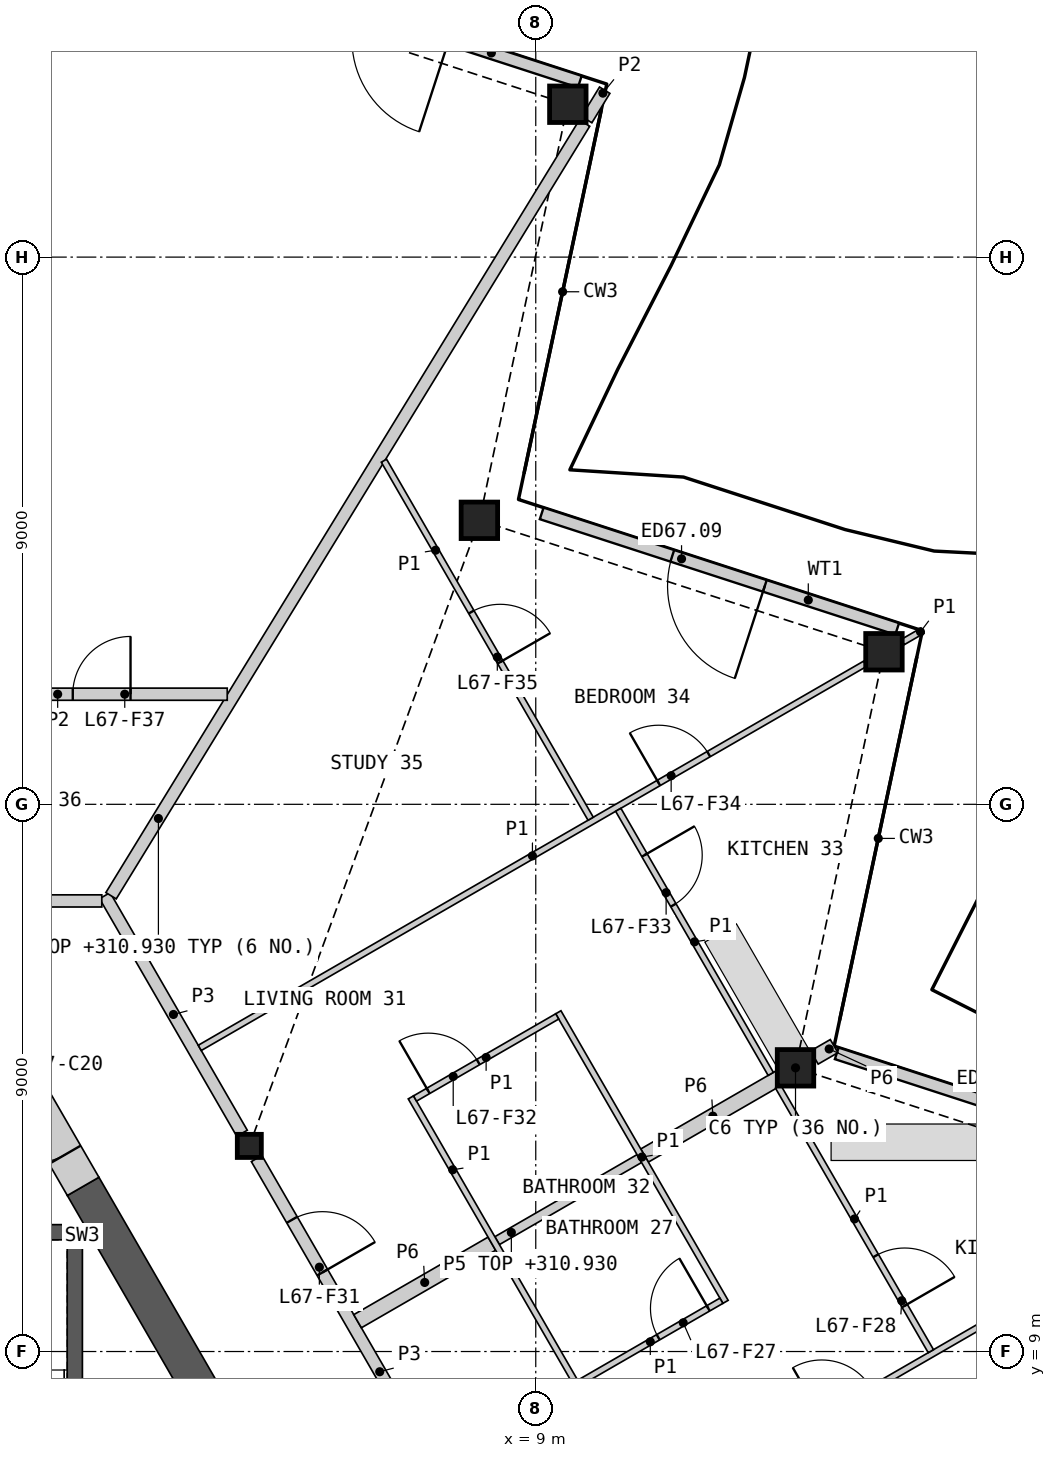
"""IFC4 building model, lengths in metres.
Left out: names, types, materials, properties, quantities, classifications, styles, units other than length and angle.
Written with IfcOpenShell. Run it as: python <this file> out.ifc"""

import sys

from ifc_helpers import new_model, si_unit, direction, frame, frame_2d, origin, origin_2d, place, context, subcontext, project, spatial, polyline, rectangle, hollow_rectangle, i_section, outline, extrude, element, fill, save


model = new_model("IFC4")
c1 = context("Model", 3, precision=1e-05, world=origin(), true_north=direction((0.0, 1.0)))
c2 = subcontext(c1, "Body", "Model", "MODEL_VIEW")
j1 = project(units=[si_unit("LENGTHUNIT", "METRE"), si_unit("PLANEANGLEUNIT", "RADIAN")], contexts=[c1])
p1 = place(None, origin())
s1 = spatial("IfcSite", under=j1, at=p1, CompositionType="ELEMENT")
p2 = place(p1, origin())
s2 = spatial("IfcBuilding", under=s1, at=p2, CompositionType="ELEMENT")
p3 = place(p2, frame((0.0, 0.0, 308.6)))
s3 = spatial("IfcBuildingStorey", under=s2, at=p3, CompositionType="ELEMENT", Elevation=308.6)
for number, where, z_axis, x_axis in (
    (1, (13.272, 13.666, 0.0), (0.0, 0.0, 1.0), (1.0, 0.0, 0.0)),
    (2, (14.727, 20.509, 0.0), (0.0, 0.0, 1.0), (1.0, 0.0, 0.0)),
    (3, (8.073, 22.671, 0.0), (0.0, 0.0, 1.0), (1.0, 0.0, 0.0)),
    (4, (9.527, 29.514, 0.0), (0.0, 0.0, 1.0), (1.0, 0.0, 0.0)),
):
    element("IfcColumn", number, at=place(p3, frame(where, z_axis=z_axis, x_axis=x_axis)), inside=s3, PredefinedType="COLUMN", context=c2, shape_type="SweptSolid", body=[
        extrude(hollow_rectangle(XDim=0.6, YDim=0.6, WallThickness=0.04, at=origin_2d()), origin(), (0.0, 0.0, 1.0), 3.4),
    ])
p4 = place(p3, frame((4.289, 12.382, 0.0), z_axis=(0.0, 0.0, 1.0), x_axis=(1.0, 0.0, 0.0)))
e5 = element("IfcColumn", 5, at=p4, inside=s3, PredefinedType="COLUMN", context=c2, shape_type="SweptSolid", body=[
    extrude(i_section(OverallWidth=0.396, OverallDepth=0.381, WebThickness=0.019, FlangeThickness=0.03, at=origin_2d()), origin(), (0.0, 0.0, 1.0), 3.4),
])
p5 = place(p3, frame((20.178, 11.88, 0.0), z_axis=(0.0, 0.0, 1.0), x_axis=(-0.951053245104, 0.309027061884, 0.0)))
e6 = element("IfcWall", 6, at=p5, inside=s3, PredefinedType="SOLIDWALL", context=c2, shape_type="SweptSolid", body=[
    extrude(rectangle(XDim=6.549, YDim=0.2, at=frame_2d((3.274, 0.0))), origin(), (0.0, 0.0, 1.0), 2.488),
])
p6 = place(p5, frame((2.334, 0.0, 0.0)))
e7 = element("IfcOpeningElement", 7, at=p6, cuts=e6, PredefinedType="OPENING", context=c2, shape_type="SweptSolid", body=[
    extrude(rectangle(XDim=1.6, YDim=2.25, at=frame_2d((0.8, 1.125))), frame((0.0, 0.11, 0.0), z_axis=(0.0, -1.0, 0.0), x_axis=(1.0, 0.0, 0.0)), (0.0, 0.0, 1.0), 0.22),
])
p7 = place(p3, frame((14.944, 20.885, 0.0), z_axis=(0.0, 0.0, 1.0), x_axis=(-0.951062668065, 0.308998060534, 0.0)))
e8 = element("IfcWall", 8, at=p7, inside=s3, PredefinedType="SOLIDWALL", context=c2, shape_type="SweptSolid", body=[
    extrude(rectangle(XDim=6.147, YDim=0.2, at=frame_2d((3.073, 0.0))), origin(), (0.0, 0.0, 1.0), 2.488),
])
p8 = place(p7, frame((2.288, 0.0, 0.0)))
e9 = element("IfcOpeningElement", 9, at=p8, cuts=e8, PredefinedType="OPENING", context=c2, shape_type="SweptSolid", body=[
    extrude(rectangle(XDim=1.6, YDim=2.25, at=frame_2d((0.8, 1.125))), frame((0.0, 0.11, 0.0), z_axis=(0.0, -1.0, 0.0), x_axis=(1.0, 0.0, 0.0)), (0.0, 0.0, 1.0), 0.22),
])
p9 = place(p3, frame((9.724, 29.885, 0.0), z_axis=(0.0, 0.0, 1.0), x_axis=(-0.951066325824, 0.30898680212, 0.0)))
e10 = element("IfcWall", 10, at=p9, inside=s3, PredefinedType="SOLIDWALL", context=c2, shape_type="SweptSolid", body=[
    extrude(rectangle(XDim=6.117, YDim=0.2, at=frame_2d((3.059, 0.0))), origin(), (0.0, 0.0, 1.0), 2.488),
])
p10 = place(p9, frame((2.259, 0.0, 0.0)))
e11 = element("IfcOpeningElement", 11, at=p10, cuts=e10, PredefinedType="OPENING", context=c2, shape_type="SweptSolid", body=[
    extrude(rectangle(XDim=1.6, YDim=2.25, at=frame_2d((0.8, 1.125))), frame((0.0, 0.11, 0.0), z_axis=(0.0, -1.0, 0.0), x_axis=(1.0, 0.0, 0.0)), (0.0, 0.0, 1.0), 0.22),
])
p11 = place(p3, origin())
e12 = element("IfcWall", 12, at=p11, inside=s3, PredefinedType="SHEAR", context=c2, shape_type="SweptSolid", body=[
    extrude(outline(polyline([(1.544, 5.237), (1.544, 11.087), (1.294, 10.837), (1.294, 5.237), (1.544, 5.237)])), origin(), (0.0, 0.0, 1.0), 3.1),
])
p12 = place(p3, origin())
e13 = element("IfcWall", 13, at=p12, inside=s3, PredefinedType="SHEAR", context=c2, shape_type="SweptSolid", body=[
    extrude(outline(polyline([(1.544, 11.087), (-1.544, 11.087), (-1.294, 10.837), (1.294, 10.837), (1.544, 11.087)])), origin(), (0.0, 0.0, 1.0), 3.1),
])
p13 = place(p3, frame((8.841, -0.902, 0.0), z_axis=(0.0, 0.0, 1.0), x_axis=(-0.499995618375, 0.866027933502, 0.0)))
e14 = element("IfcWall", 14, at=p13, inside=s3, PredefinedType="SHEAR", context=c2, shape_type="SweptSolid", body=[
    extrude(rectangle(XDim=14.571, YDim=0.6, at=frame_2d((7.285, 0.0))), origin(), (0.0, 0.0, 1.0), 3.1),
])
p14 = place(p3, frame((1.556, 11.716, 0.0), z_axis=(0.0, 0.0, 1.0), x_axis=(-0.500018667571, 0.866014625789, 0.0)))
e15 = element("IfcWall", 15, at=p14, inside=s3, PredefinedType="SHEAR", context=c2, shape_type="SweptSolid", body=[
    extrude(rectangle(XDim=2.592, YDim=0.6, at=frame_2d((1.296, 0.0))), origin(), (0.0, 0.0, 1.0), 3.1),
])
p15 = place(p14, frame((0.6, 0.0, 0.0)))
e16 = element("IfcOpeningElement", 16, at=p15, cuts=e15, PredefinedType="OPENING", context=c2, shape_type="SweptSolid", body=[
    extrude(rectangle(XDim=1.0, YDim=2.1, at=frame_2d((0.5, 1.05))), frame((0.0, 0.31, 0.0), z_axis=(0.0, -1.0, 0.0), x_axis=(1.0, 0.0, 0.0)), (0.0, 0.0, 1.0), 0.62),
])
p16 = place(p3, frame((4.409, 12.174, 0.0), z_axis=(0.0, 0.0, 1.0), x_axis=(0.499984266882, -0.866034487114, 0.0)))
e17 = element("IfcWall", 17, at=p16, inside=s3, PredefinedType="PARTITIONING", context=c2, shape_type="SweptSolid", body=[
    extrude(rectangle(XDim=8.099, YDim=0.2, at=frame_2d((4.049, 0.0))), origin(), (0.0, 0.0, 1.0), 3.1),
])
p17 = place(p16, frame((5.123, 0.0, 0.0)))
e18 = element("IfcOpeningElement", 18, at=p17, cuts=e17, PredefinedType="OPENING", context=c2, shape_type="SweptSolid", body=[
    extrude(rectangle(XDim=1.0, YDim=2.1, at=frame_2d((0.5, 1.05))), frame((0.0, 0.11, 0.0), z_axis=(0.0, -1.0, 0.0), x_axis=(1.0, 0.0, 0.0)), (0.0, 0.0, 1.0), 0.22),
])
p18 = place(p16, frame((1.164, 0.0, 0.0)))
e19 = element("IfcOpeningElement", 19, at=p18, cuts=e17, PredefinedType="OPENING", context=c2, shape_type="SweptSolid", body=[
    extrude(rectangle(XDim=1.0, YDim=2.1, at=frame_2d((0.5, 1.05))), frame((0.0, 0.11, 0.0), z_axis=(0.0, -1.0, 0.0), x_axis=(1.0, 0.0, 0.0)), (0.0, 0.0, 1.0), 0.22),
])
p19 = place(p3, frame((1.913, 16.498, 0.0), z_axis=(0.0, 0.0, 1.0), x_axis=(0.499950370306, -0.866054055606, 0.0)))
e20 = element("IfcWall", 20, at=p19, inside=s3, PredefinedType="PARTITIONING", context=c2, shape_type="SweptSolid", body=[
    extrude(rectangle(XDim=4.513, YDim=0.2, at=frame_2d((2.256, 0.0))), origin(), (0.0, 0.0, 1.0), 3.1),
])
p20 = place(p3, frame((-1.863, 16.411, 0.0), z_axis=(0.0, 0.0, 1.0), x_axis=(1.0, 0.0, 0.0)))
e21 = element("IfcWall", 21, at=p20, inside=s3, PredefinedType="PARTITIONING", context=c2, shape_type="SweptSolid", body=[
    extrude(rectangle(XDim=3.726, YDim=0.2, at=frame_2d((1.863, 0.0))), origin(), (0.0, 0.0, 1.0), 3.1),
])
p21 = place(p20, frame((1.388, 0.0, 0.0)))
e22 = element("IfcOpeningElement", 22, at=p21, cuts=e21, PredefinedType="OPENING", context=c2, shape_type="SweptSolid", body=[
    extrude(rectangle(XDim=0.95, YDim=2.1, at=frame_2d((0.475, 1.05))), frame((0.0, 0.11, 0.0), z_axis=(0.0, -1.0, 0.0), x_axis=(1.0, 0.0, 0.0)), (0.0, 0.0, 1.0), 0.22),
])
p22 = place(p3, frame((6.07, 9.498, 0.0), z_axis=(0.0, 0.0, 1.0), x_axis=(0.866054858364, 0.499948979701, 0.0)))
e23 = element("IfcWall", 23, at=p22, inside=s3, PredefinedType="PARTITIONING", context=c2, shape_type="SweptSolid", body=[
    extrude(rectangle(XDim=2.55, YDim=0.25, at=frame_2d((1.275, 0.0))), origin(), (0.0, 0.0, 1.0), 2.33),
])
p23 = place(p3, frame((10.789, 12.223, 0.0), z_axis=(0.0, 0.0, 1.0), x_axis=(0.866033547976, 0.499985893582, 0.0)))
e24 = element("IfcWall", 24, at=p23, inside=s3, PredefinedType="PARTITIONING", context=c2, shape_type="SweptSolid", body=[
    extrude(rectangle(XDim=2.594, YDim=0.25, at=frame_2d((1.297, 0.0))), origin(), (0.0, 0.0, 1.0), 2.33),
])
p24 = place(p3, frame((13.582, 13.835, 0.0), z_axis=(0.0, 0.0, 1.0), x_axis=(0.865827443207, 0.500342721131, 0.0)))
e25 = element("IfcWall", 25, at=p24, inside=s3, PredefinedType="PARTITIONING", context=c2, shape_type="SweptSolid", body=[
    extrude(rectangle(XDim=0.375, YDim=0.25, at=frame_2d((0.188, 0.0))), origin(), (0.0, 0.0, 1.0), 2.33),
])
p25 = place(p3, frame((2.015, 16.496, 0.0), z_axis=(0.0, 0.0, 1.0), x_axis=(0.522487920222, 0.852646687217, 0.0)))
e26 = element("IfcWall", 26, at=p25, inside=s3, PredefinedType="PARTITIONING", context=c2, shape_type="SweptSolid", body=[
    extrude(rectangle(XDim=14.904, YDim=0.2, at=frame_2d((7.452, 0.0))), origin(), (0.0, 0.0, 1.0), 2.33),
])
p26 = place(p3, frame((0.208, 19.811, 0.0), z_axis=(0.0, 0.0, 1.0), x_axis=(1.0, 0.0, 0.0)))
e27 = element("IfcWall", 27, at=p26, inside=s3, PredefinedType="PARTITIONING", context=c2, shape_type="SweptSolid", body=[
    extrude(rectangle(XDim=3.718, YDim=0.2, at=frame_2d((1.859, 0.0))), origin(), (0.0, 0.0, 1.0), 2.33),
])
p27 = place(p26, frame((1.178, 0.0, 0.0)))
e28 = element("IfcOpeningElement", 28, at=p27, cuts=e27, PredefinedType="OPENING", context=c2, shape_type="SweptSolid", body=[
    extrude(rectangle(XDim=0.95, YDim=2.1, at=frame_2d((0.475, 1.05))), frame((0.0, 0.11, 0.0), z_axis=(0.0, -1.0, 0.0), x_axis=(1.0, 0.0, 0.0)), (0.0, 0.0, 1.0), 0.22),
])
p28 = place(p3, frame((9.837, 29.261, 0.0), z_axis=(0.0, 0.0, 1.0), x_axis=(0.5225115935, 0.852632180168, 0.0)))
e29 = element("IfcWall", 29, at=p28, inside=s3, PredefinedType="PARTITIONING", context=c2, shape_type="SweptSolid", body=[
    extrude(rectangle(XDim=0.567, YDim=0.2, at=frame_2d((0.284, 0.0))), origin(), (0.0, 0.0, 1.0), 2.33),
])
p29 = place(p3, frame((8.365, 10.823, 0.0), z_axis=(0.0, 0.0, 1.0), x_axis=(0.866019956843, 0.50000943426, 0.0)))
e30 = element("IfcWall", 30, at=p29, inside=s3, PredefinedType="PLUMBINGWALL", context=c2, shape_type="SweptSolid", body=[
    extrude(rectangle(XDim=2.7, YDim=0.15, at=frame_2d((1.35, 0.0))), origin(), (0.0, 0.0, 1.0), 2.33),
])
p30 = place(p3, frame((3.474, 13.994, 0.0), z_axis=(0.0, 0.0, 1.0), x_axis=(0.866032424046, 0.499987840353, 0.0)))
e31 = element("IfcWall", 31, at=p30, inside=s3, PredefinedType="PARTITIONING", context=c2, shape_type="SweptSolid", body=[
    extrude(rectangle(XDim=12.635, YDim=0.1, at=frame_2d((6.317, 0.0))), origin(), (0.0, 0.0, 1.0), 2.33),
])
p31 = place(p30, frame((8.714, 0.0, 0.0)))
e32 = element("IfcOpeningElement", 32, at=p31, cuts=e31, PredefinedType="OPENING", context=c2, shape_type="SweptSolid", body=[
    extrude(rectangle(XDim=0.95, YDim=2.1, at=frame_2d((0.475, 1.05))), frame((0.0, 0.06, 0.0), z_axis=(0.0, -1.0, 0.0), x_axis=(1.0, 0.0, 0.0)), (0.0, 0.0, 1.0), 0.12),
])
p32 = place(p3, frame((8.786, 5.073, 0.0), z_axis=(0.0, 0.0, 1.0), x_axis=(0.86602139559, 0.500006942333, 0.0)))
e33 = element("IfcWall", 33, at=p32, inside=s3, PredefinedType="PARTITIONING", context=c2, shape_type="SweptSolid", body=[
    extrude(rectangle(XDim=12.505, YDim=0.1, at=frame_2d((6.252, 0.0))), origin(), (0.0, 0.0, 1.0), 2.33),
])
p33 = place(p32, frame((5.677, 0.0, 0.0)))
e34 = element("IfcOpeningElement", 34, at=p33, cuts=e33, PredefinedType="OPENING", context=c2, shape_type="SweptSolid", body=[
    extrude(rectangle(XDim=0.95, YDim=2.1, at=frame_2d((0.475, 1.05))), frame((0.0, 0.06, 0.0), z_axis=(0.0, -1.0, 0.0), x_axis=(1.0, 0.0, 0.0)), (0.0, 0.0, 1.0), 0.12),
])
p34 = place(p3, frame((6.503, 23.652, 0.0), z_axis=(0.0, 0.0, 1.0), x_axis=(0.50002393615, -0.866011583801, 0.0)))
e35 = element("IfcWall", 35, at=p34, inside=s3, PredefinedType="PARTITIONING", context=c2, shape_type="SweptSolid", body=[
    extrude(rectangle(XDim=6.8, YDim=0.1, at=frame_2d((3.4, 0.0))), origin(), (0.0, 0.0, 1.0), 2.33),
])
p35 = place(p34, frame((2.874, 0.0, 0.0)))
e36 = element("IfcOpeningElement", 36, at=p35, cuts=e35, PredefinedType="OPENING", context=c2, shape_type="SweptSolid", body=[
    extrude(rectangle(XDim=0.95, YDim=2.1, at=frame_2d((0.475, 1.05))), frame((0.0, 0.06, 0.0), z_axis=(0.0, -1.0, 0.0), x_axis=(1.0, 0.0, 0.0)), (0.0, 0.0, 1.0), 0.12),
])
p36 = place(p3, frame((9.371, 14.58, 0.0), z_axis=(0.0, 0.0, 1.0), x_axis=(0.499996545922, -0.866027397988, 0.0)))
e37 = element("IfcWall", 37, at=p36, inside=s3, PredefinedType="PARTITIONING", context=c2, shape_type="SweptSolid", body=[
    extrude(rectangle(XDim=5.5, YDim=0.1, at=frame_2d((2.75, 0.0))), origin(), (0.0, 0.0, 1.0), 2.33),
])
p37 = place(p3, frame((6.946, 13.18, 0.0), z_axis=(0.0, 0.0, 1.0), x_axis=(0.500015767406, -0.866016300277, 0.0)))
e38 = element("IfcWall", 38, at=p37, inside=s3, PredefinedType="PARTITIONING", context=c2, shape_type="SweptSolid", body=[
    extrude(rectangle(XDim=5.5, YDim=0.1, at=frame_2d((2.75, 0.0))), origin(), (0.0, 0.0, 1.0), 2.33),
])
p38 = place(p3, frame((10.357, 17.91, 0.0), z_axis=(0.0, 0.0, 1.0), x_axis=(0.50000754391, -0.866021048262, 0.0)))
e39 = element("IfcWall", 39, at=p38, inside=s3, PredefinedType="PARTITIONING", context=c2, shape_type="SweptSolid", body=[
    extrude(rectangle(XDim=5.016, YDim=0.1, at=frame_2d((2.508, 0.0))), origin(), (0.0, 0.0, 1.0), 2.33),
])
p39 = place(p38, frame((0.861, 0.0, 0.0)))
e40 = element("IfcOpeningElement", 40, at=p39, cuts=e39, PredefinedType="OPENING", context=c2, shape_type="SweptSolid", body=[
    extrude(rectangle(XDim=0.95, YDim=2.1, at=frame_2d((0.475, 1.05))), frame((0.0, 0.06, 0.0), z_axis=(0.0, -1.0, 0.0), x_axis=(1.0, 0.0, 0.0)), (0.0, 0.0, 1.0), 0.12),
])
p40 = place(p3, frame((12.986, 13.356, 0.0), z_axis=(0.0, 0.0, 1.0), x_axis=(0.500007128048, -0.866021288365, 0.0)))
e41 = element("IfcWall", 41, at=p40, inside=s3, PredefinedType="PARTITIONING", context=c2, shape_type="SweptSolid", body=[
    extrude(rectangle(XDim=5.023, YDim=0.1, at=frame_2d((2.512, 0.0))), origin(), (0.0, 0.0, 1.0), 2.33),
])
p41 = place(p40, frame((3.211, 0.0, 0.0)))
e42 = element("IfcOpeningElement", 42, at=p41, cuts=e41, PredefinedType="OPENING", context=c2, shape_type="SweptSolid", body=[
    extrude(rectangle(XDim=0.95, YDim=2.1, at=frame_2d((0.475, 1.05))), frame((0.0, 0.06, 0.0), z_axis=(0.0, -1.0, 0.0), x_axis=(1.0, 0.0, 0.0)), (0.0, 0.0, 1.0), 0.12),
])
p42 = place(p3, frame((7.015, 13.162, 0.0), z_axis=(0.0, 0.0, 1.0), x_axis=(0.866036505625, 0.499980770555, 0.0)))
e43 = element("IfcWall", 43, at=p42, inside=s3, PredefinedType="PARTITIONING", context=c2, shape_type="SweptSolid", body=[
    extrude(rectangle(XDim=2.7, YDim=0.1, at=frame_2d((1.35, 0.0))), origin(), (0.0, 0.0, 1.0), 2.33),
])
p43 = place(p42, frame((0.25, 0.0, 0.0)))
e44 = element("IfcOpeningElement", 44, at=p43, cuts=e43, PredefinedType="OPENING", context=c2, shape_type="SweptSolid", body=[
    extrude(rectangle(XDim=0.95, YDim=2.1, at=frame_2d((0.475, 1.05))), frame((0.0, 0.06, 0.0), z_axis=(0.0, -1.0, 0.0), x_axis=(1.0, 0.0, 0.0)), (0.0, 0.0, 1.0), 0.12),
])
p44 = place(p3, frame((9.715, 8.485, 0.0), z_axis=(0.0, 0.0, 1.0), x_axis=(0.866036505625, 0.499980770555, 0.0)))
e45 = element("IfcWall", 45, at=p44, inside=s3, PredefinedType="PARTITIONING", context=c2, shape_type="SweptSolid", body=[
    extrude(rectangle(XDim=2.7, YDim=0.1, at=frame_2d((1.35, 0.0))), origin(), (0.0, 0.0, 1.0), 2.33),
])
p45 = place(p44, frame((1.5, 0.0, 0.0)))
e46 = element("IfcOpeningElement", 46, at=p45, cuts=e45, PredefinedType="OPENING", context=c2, shape_type="SweptSolid", body=[
    extrude(rectangle(XDim=0.95, YDim=2.1, at=frame_2d((0.475, 1.05))), frame((0.0, 0.06, 0.0), z_axis=(0.0, -1.0, 0.0), x_axis=(1.0, 0.0, 0.0)), (0.0, 0.0, 1.0), 0.12),
])
p46 = place(p3, frame((15.037, 20.669, 0.0), z_axis=(0.0, 0.0, 1.0), x_axis=(0.865770353626, 0.500441499861, 0.0)))
e47 = element("IfcWall", 47, at=p46, inside=s3, PredefinedType="PARTITIONING", context=c2, shape_type="SweptSolid", body=[
    extrude(rectangle(XDim=0.372, YDim=0.1, at=frame_2d((0.186, 0.0))), origin(), (0.0, 0.0, 1.0), 2.33),
])
p47 = place(p8, origin())
e48 = element("IfcDoor", 48, at=p47, inside=s3, OperationType="DOUBLE_DOOR_SINGLE_SWING", PredefinedType="DOOR", context=c2, shape_type="SweptSolid", body=[
    extrude(rectangle(XDim=1.6, YDim=2.25, at=frame_2d((0.8, 1.125))), frame((0.0, 0.025, 0.0), z_axis=(0.0, -1.0, 0.0), x_axis=(1.0, 0.0, 0.0)), (0.0, 0.0, 1.0), 0.05),
])
fill(e9, e48)
p48 = place(p15, origin())
e49 = element("IfcDoor", 49, at=p48, inside=s3, OperationType="SINGLE_SWING_RIGHT", PredefinedType="DOOR", context=c2, shape_type="SweptSolid", body=[
    extrude(rectangle(XDim=1.0, YDim=2.1, at=frame_2d((0.5, 1.05))), frame((0.0, 0.055, 0.0), z_axis=(0.0, -1.0, 0.0), x_axis=(1.0, 0.0, 0.0)), (0.0, 0.0, 1.0), 0.05),
])
fill(e16, e49)
p49 = place(p45, origin())
e50 = element("IfcDoor", 50, at=p49, inside=s3, OperationType="SINGLE_SWING_RIGHT", PredefinedType="DOOR", context=c2, shape_type="SweptSolid", body=[
    extrude(rectangle(XDim=0.95, YDim=2.1, at=frame_2d((0.475, 1.05))), frame((0.0, 0.025, 0.0), z_axis=(0.0, -1.0, 0.0), x_axis=(1.0, 0.0, 0.0)), (0.0, 0.0, 1.0), 0.05),
])
fill(e46, e50)
p50 = place(p41, origin())
e51 = element("IfcDoor", 51, at=p50, inside=s3, OperationType="SINGLE_SWING_RIGHT", PredefinedType="DOOR", context=c2, shape_type="SweptSolid", body=[
    extrude(rectangle(XDim=0.95, YDim=2.1, at=frame_2d((0.475, 1.05))), frame((0.0, 0.025, 0.0), z_axis=(0.0, -1.0, 0.0), x_axis=(1.0, 0.0, 0.0)), (0.0, 0.0, 1.0), 0.05),
])
fill(e42, e51)
p51 = place(p18, origin())
e52 = element("IfcDoor", 52, at=p51, inside=s3, OperationType="SINGLE_SWING_RIGHT", PredefinedType="DOOR", context=c2, shape_type="SweptSolid", body=[
    extrude(rectangle(XDim=1.0, YDim=2.1, at=frame_2d((0.5, 1.05))), frame((0.0, 0.025, 0.0), z_axis=(0.0, -1.0, 0.0), x_axis=(1.0, 0.0, 0.0)), (0.0, 0.0, 1.0), 0.05),
])
fill(e19, e52)
p52 = place(p43, origin())
e53 = element("IfcDoor", 53, at=p52, inside=s3, OperationType="SINGLE_SWING_LEFT", PredefinedType="DOOR", context=c2, shape_type="SweptSolid", body=[
    extrude(rectangle(XDim=0.95, YDim=2.1, at=frame_2d((0.475, 1.05))), frame((0.0, 0.025, 0.0), z_axis=(0.0, -1.0, 0.0), x_axis=(1.0, 0.0, 0.0)), (0.0, 0.0, 1.0), 0.05),
])
fill(e44, e53)
p53 = place(p39, origin())
e54 = element("IfcDoor", 54, at=p53, inside=s3, OperationType="SINGLE_SWING_LEFT", PredefinedType="DOOR", context=c2, shape_type="SweptSolid", body=[
    extrude(rectangle(XDim=0.95, YDim=2.1, at=frame_2d((0.475, 1.05))), frame((0.0, 0.025, 0.0), z_axis=(0.0, -1.0, 0.0), x_axis=(1.0, 0.0, 0.0)), (0.0, 0.0, 1.0), 0.05),
])
fill(e40, e54)
p54 = place(p31, origin())
e55 = element("IfcDoor", 55, at=p54, inside=s3, OperationType="SINGLE_SWING_LEFT", PredefinedType="DOOR", context=c2, shape_type="SweptSolid", body=[
    extrude(rectangle(XDim=0.95, YDim=2.1, at=frame_2d((0.475, 1.05))), frame((0.0, 0.025, 0.0), z_axis=(0.0, -1.0, 0.0), x_axis=(1.0, 0.0, 0.0)), (0.0, 0.0, 1.0), 0.05),
])
fill(e32, e55)
p55 = place(p35, origin())
e56 = element("IfcDoor", 56, at=p55, inside=s3, OperationType="SINGLE_SWING_RIGHT", PredefinedType="DOOR", context=c2, shape_type="SweptSolid", body=[
    extrude(rectangle(XDim=0.95, YDim=2.1, at=frame_2d((0.475, 1.05))), frame((0.0, 0.025, 0.0), z_axis=(0.0, -1.0, 0.0), x_axis=(1.0, 0.0, 0.0)), (0.0, 0.0, 1.0), 0.05),
])
fill(e36, e56)
p56 = place(p27, origin())
e57 = element("IfcDoor", 57, at=p56, inside=s3, OperationType="SINGLE_SWING_RIGHT", PredefinedType="DOOR", context=c2, shape_type="SweptSolid", body=[
    extrude(rectangle(XDim=0.95, YDim=2.1, at=frame_2d((0.475, 1.05))), frame((0.0, 0.025, 0.0), z_axis=(0.0, -1.0, 0.0), x_axis=(1.0, 0.0, 0.0)), (0.0, 0.0, 1.0), 0.05),
])
fill(e28, e57)
save(model, sys.argv[1])
